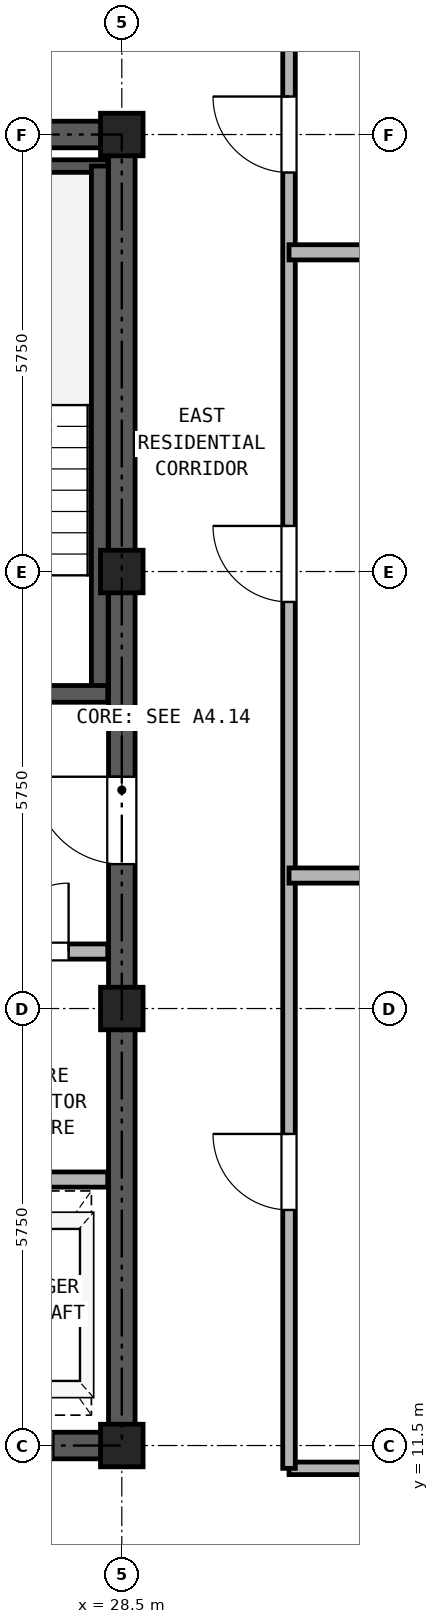
"""IFC4 building model, lengths in metres.
Left out: names, types, materials, properties, quantities, classifications, styles, units other than length and angle.
Written with IfcOpenShell. Run it as: python <this file> out.ifc"""

import sys

from ifc_helpers import new_model, si_unit, direction, frame, frame_2d, origin, origin_2d, place, context, subcontext, project, spatial, rectangle, hollow_rectangle, extrude, source, transform, mapped, element, fill, save


model = new_model("IFC4")
c1 = context("Model", 3, precision=1e-05, world=origin(), true_north=direction((0.0, 1.0)))
c2 = subcontext(c1, "Body", "Model", "MODEL_VIEW")
j1 = project(units=[si_unit("LENGTHUNIT", "METRE"), si_unit("PLANEANGLEUNIT", "RADIAN")], contexts=[c1])
p1 = place(None, origin())
s1 = spatial("IfcSite", under=j1, at=p1, CompositionType="ELEMENT")
p2 = place(p1, origin())
s2 = spatial("IfcBuilding", under=s1, at=p2, CompositionType="ELEMENT")
p3 = place(p2, frame((0.0, 0.0, 248.9)))
s3 = spatial("IfcBuildingStorey", under=s2, at=p3, CompositionType="ELEMENT", Elevation=248.9)
m1 = source(origin(), c2, "Body", "SweptSolid", [
    extrude(hollow_rectangle(XDim=0.56, YDim=0.56, WallThickness=0.03, at=origin_2d()), origin(), (0.0, 0.0, 1.0), 2.98),
])
for number, where, z_axis, x_axis in (
    (1, (28.5, 11.5, 0.0), (0.0, 0.0, 1.0), (1.0, 0.0, 0.0)),
    (2, (28.5, 17.25, 0.0), (0.0, 0.0, 1.0), (1.0, 0.0, 0.0)),
    (3, (28.5, 23.0, 0.0), (0.0, 0.0, 1.0), (1.0, 0.0, 0.0)),
    (4, (28.5, 28.75, 0.0), (0.0, 0.0, 1.0), (1.0, 0.0, 0.0)),
):
    element("IfcColumn", number, at=place(p3, frame(where, z_axis=z_axis, x_axis=x_axis)), inside=s3, PredefinedType="COLUMN", context=c2, shape_type="MappedRepresentation", body=[
        mapped(m1, transform((0.0, 0.0, 0.0), x_axis=(1.0, 0.0, 0.0), y_axis=(0.0, 1.0, 0.0), z_axis=(0.0, 0.0, 1.0), scale=1.0)),
    ])
p4 = place(p3, frame((18.325, 11.5, 0.0), z_axis=(0.0, 0.0, 1.0), x_axis=(1.0, 0.0, 0.0)))
e5 = element("IfcWall", 5, at=p4, inside=s3, PredefinedType="SHEAR", context=c2, shape_type="SweptSolid", body=[
    extrude(rectangle(XDim=10.35, YDim=0.35, at=frame_2d((5.175, 0.0))), origin(), (0.0, 0.0, 1.0), 2.98),
])
p5 = place(p4, frame((1.775, 0.0, 0.0)))
e6 = element("IfcOpeningElement", 6, at=p5, cuts=e5, PredefinedType="OPENING", context=c2, shape_type="SweptSolid", body=[
    extrude(rectangle(XDim=0.95, YDim=2.15, at=frame_2d((0.475, 1.075))), frame((0.0, 0.185, 0.0), z_axis=(0.0, -1.0, 0.0), x_axis=(1.0, 0.0, 0.0)), (0.0, 0.0, 1.0), 0.37),
])
p6 = place(p4, frame((5.275, 0.0, 0.0)))
e7 = element("IfcOpeningElement", 7, at=p6, cuts=e5, PredefinedType="OPENING", context=c2, shape_type="SweptSolid", body=[
    extrude(rectangle(XDim=0.95, YDim=2.15, at=frame_2d((0.475, 1.075))), frame((0.0, 0.185, 0.0), z_axis=(0.0, -1.0, 0.0), x_axis=(1.0, 0.0, 0.0)), (0.0, 0.0, 1.0), 0.37),
])
p7 = place(p4, frame((8.175, 0.0, 0.0)))
e8 = element("IfcOpeningElement", 8, at=p7, cuts=e5, PredefinedType="OPENING", context=c2, shape_type="SweptSolid", body=[
    extrude(rectangle(XDim=1.1, YDim=2.25, at=frame_2d((0.55, 1.125))), frame((0.0, 0.185, 0.0), z_axis=(0.0, -1.0, 0.0), x_axis=(1.0, 0.0, 0.0)), (0.0, 0.0, 1.0), 0.37),
])
p8 = place(p3, frame((18.325, 28.75, 0.0), z_axis=(0.0, 0.0, 1.0), x_axis=(1.0, 0.0, 0.0)))
e9 = element("IfcWall", 9, at=p8, inside=s3, PredefinedType="SHEAR", context=c2, shape_type="SweptSolid", body=[
    extrude(rectangle(XDim=10.35, YDim=0.35, at=frame_2d((5.175, 0.0))), origin(), (0.0, 0.0, 1.0), 2.98),
])
p9 = place(p8, frame((4.055, 0.0, 0.0)))
e10 = element("IfcOpeningElement", 10, at=p9, cuts=e9, PredefinedType="OPENING", context=c2, shape_type="SweptSolid", body=[
    extrude(rectangle(XDim=0.9, YDim=2.05, at=frame_2d((0.45, 1.025))), frame((0.0, 0.185, 0.0), z_axis=(0.0, -1.0, 0.0), x_axis=(1.0, 0.0, 0.0)), (0.0, 0.0, 1.0), 0.37),
])
p10 = place(p8, frame((5.595, 0.0, 0.0)))
e11 = element("IfcOpeningElement", 11, at=p10, cuts=e9, PredefinedType="OPENING", context=c2, shape_type="SweptSolid", body=[
    extrude(rectangle(XDim=0.9, YDim=2.05, at=frame_2d((0.45, 1.025))), frame((0.0, 0.185, 0.0), z_axis=(0.0, -1.0, 0.0), x_axis=(1.0, 0.0, 0.0)), (0.0, 0.0, 1.0), 0.37),
])
p11 = place(p3, frame((28.5, 11.675, 0.0), z_axis=(0.0, 0.0, 1.0), x_axis=(0.0, 1.0, 0.0)))
e12 = element("IfcWall", 12, at=p11, inside=s3, PredefinedType="SHEAR", context=c2, shape_type="SweptSolid", body=[
    extrude(rectangle(XDim=16.9, YDim=0.35, at=frame_2d((8.45, 0.0))), origin(), (0.0, 0.0, 1.0), 2.98),
])
p12 = place(p11, frame((7.475, 0.0, 0.0)))
e13 = element("IfcOpeningElement", 13, at=p12, cuts=e12, PredefinedType="OPENING", context=c2, shape_type="SweptSolid", body=[
    extrude(rectangle(XDim=1.15, YDim=2.2, at=frame_2d((0.575, 1.1))), frame((0.0, 0.185, 0.0), z_axis=(0.0, -1.0, 0.0), x_axis=(1.0, 0.0, 0.0)), (0.0, 0.0, 1.0), 0.37),
])
p13 = place(p3, frame((25.13, 28.335, 0.0), z_axis=(0.0, 0.0, 1.0), x_axis=(1.0, 0.0, 0.0)))
e14 = element("IfcWall", 14, at=p13, inside=s3, PredefinedType="PARTITIONING", context=c2, shape_type="SweptSolid", body=[
    extrude(rectangle(XDim=3.185, YDim=0.165, at=frame_2d((1.593, 0.0))), origin(), (0.0, 0.0, 1.0), 2.98),
])
p14 = place(p3, frame((28.21, 21.39, 0.0), z_axis=(0.0, 0.0, 1.0), x_axis=(0.0, 1.0, 0.0)))
e15 = element("IfcWall", 15, at=p14, inside=s3, PredefinedType="SOLIDWALL", context=c2, shape_type="SweptSolid", body=[
    extrude(rectangle(XDim=6.945, YDim=0.22, at=frame_2d((3.473, 0.0))), origin(), (0.0, 0.0, 1.0), 2.98),
])
p15 = place(p3, frame((25.13, 21.39, 0.0), z_axis=(0.0, 0.0, 1.0), x_axis=(1.0, 0.0, 0.0)))
e16 = element("IfcWall", 16, at=p15, inside=s3, PredefinedType="SOLIDWALL", context=c2, shape_type="SweptSolid", body=[
    extrude(rectangle(XDim=3.185, YDim=0.22, at=frame_2d((1.593, 0.0))), origin(), (0.0, 0.0, 1.0), 2.98),
])
p16 = place(p15, frame((0.92, 0.0, 0.0)))
e17 = element("IfcOpeningElement", 17, at=p16, cuts=e16, PredefinedType="OPENING", context=c2, shape_type="SweptSolid", body=[
    extrude(rectangle(XDim=1.15, YDim=2.2, at=frame_2d((0.575, 1.1))), frame((0.0, 0.12, 0.0), z_axis=(0.0, -1.0, 0.0), x_axis=(1.0, 0.0, 0.0)), (0.0, 0.0, 1.0), 0.24),
])
p17 = place(p3, frame((18.685, 18.0, 0.0), z_axis=(0.0, 0.0, 1.0), x_axis=(1.0, 0.0, 0.0)))
e18 = element("IfcWall", 18, at=p17, inside=s3, PredefinedType="PARTITIONING", context=c2, shape_type="SweptSolid", body=[
    extrude(rectangle(XDim=9.63, YDim=0.2, at=frame_2d((4.815, 0.0))), origin(), (0.0, 0.0, 1.0), 2.98),
])
p18 = place(p17, frame((0.565, 0.0, 0.0)))
e19 = element("IfcOpeningElement", 19, at=p18, cuts=e18, PredefinedType="OPENING", context=c2, shape_type="SweptSolid", body=[
    extrude(rectangle(XDim=1.3, YDim=2.3, at=frame_2d((0.65, 1.15))), frame((0.0, 0.11, 0.0), z_axis=(0.0, -1.0, 0.0), x_axis=(1.0, 0.0, 0.0)), (0.0, 0.0, 1.0), 0.22),
])
p19 = place(p17, frame((2.665, 0.0, 0.0)))
e20 = element("IfcOpeningElement", 20, at=p19, cuts=e18, PredefinedType="OPENING", context=c2, shape_type="SweptSolid", body=[
    extrude(rectangle(XDim=1.3, YDim=2.3, at=frame_2d((0.65, 1.15))), frame((0.0, 0.11, 0.0), z_axis=(0.0, -1.0, 0.0), x_axis=(1.0, 0.0, 0.0)), (0.0, 0.0, 1.0), 0.22),
])
p20 = place(p17, frame((5.085, 0.0, 0.0)))
e21 = element("IfcOpeningElement", 21, at=p20, cuts=e18, PredefinedType="OPENING", context=c2, shape_type="SweptSolid", body=[
    extrude(rectangle(XDim=0.9, YDim=2.05, at=frame_2d((0.45, 1.025))), frame((0.0, 0.11, 0.0), z_axis=(0.0, -1.0, 0.0), x_axis=(1.0, 0.0, 0.0)), (0.0, 0.0, 1.0), 0.22),
])
p21 = place(p17, frame((8.215, 0.0, 0.0)))
e22 = element("IfcOpeningElement", 22, at=p21, cuts=e18, PredefinedType="OPENING", context=c2, shape_type="SweptSolid", body=[
    extrude(rectangle(XDim=0.9, YDim=2.05, at=frame_2d((0.45, 1.025))), frame((0.0, 0.11, 0.0), z_axis=(0.0, -1.0, 0.0), x_axis=(1.0, 0.0, 0.0)), (0.0, 0.0, 1.0), 0.22),
])
p22 = place(p3, frame((18.685, 15.0, 0.0), z_axis=(0.0, 0.0, 1.0), x_axis=(1.0, 0.0, 0.0)))
e23 = element("IfcWall", 23, at=p22, inside=s3, PredefinedType="PARTITIONING", context=c2, shape_type="SweptSolid", body=[
    extrude(rectangle(XDim=9.63, YDim=0.2, at=frame_2d((4.815, 0.0))), origin(), (0.0, 0.0, 1.0), 2.98),
])
p23 = place(p3, frame((30.7, 11.2, 0.0), z_axis=(0.0, 0.0, 1.0), x_axis=(1.0, 0.0, 0.0)))
e24 = element("IfcWall", 24, at=p23, inside=s3, PredefinedType="PARTITIONING", context=c2, shape_type="SweptSolid", body=[
    extrude(rectangle(XDim=7.5, YDim=0.165, at=frame_2d((3.75, 0.0))), origin(), (0.0, 0.0, 1.0), 2.98),
])
p24 = place(p3, frame((30.7, 11.2, 0.0), z_axis=(0.0, 0.0, 1.0), x_axis=(0.0, 1.0, 0.0)))
e25 = element("IfcWall", 25, at=p24, inside=s3, PredefinedType="PARTITIONING", context=c2, shape_type="SweptSolid", body=[
    extrude(rectangle(XDim=23.94, YDim=0.165, at=frame_2d((11.97, 0.0))), origin(), (0.0, 0.0, 1.0), 2.98),
])
p25 = place(p24, frame((3.4, 0.0, 0.0)))
e26 = element("IfcOpeningElement", 26, at=p25, cuts=e25, PredefinedType="OPENING", context=c2, shape_type="SweptSolid", body=[
    extrude(rectangle(XDim=1.0, YDim=2.15, at=frame_2d((0.5, 1.075))), frame((0.0, 0.093, 0.0), z_axis=(0.0, -1.0, 0.0), x_axis=(1.0, 0.0, 0.0)), (0.0, 0.0, 1.0), 0.185),
])
p26 = place(p24, frame((11.4, 0.0, 0.0)))
e27 = element("IfcOpeningElement", 27, at=p26, cuts=e25, PredefinedType="OPENING", context=c2, shape_type="SweptSolid", body=[
    extrude(rectangle(XDim=1.0, YDim=2.15, at=frame_2d((0.5, 1.075))), frame((0.0, 0.093, 0.0), z_axis=(0.0, -1.0, 0.0), x_axis=(1.0, 0.0, 0.0)), (0.0, 0.0, 1.0), 0.185),
])
p27 = place(p24, frame((17.05, 0.0, 0.0)))
e28 = element("IfcOpeningElement", 28, at=p27, cuts=e25, PredefinedType="OPENING", context=c2, shape_type="SweptSolid", body=[
    extrude(rectangle(XDim=1.0, YDim=2.15, at=frame_2d((0.5, 1.075))), frame((0.0, 0.093, 0.0), z_axis=(0.0, -1.0, 0.0), x_axis=(1.0, 0.0, 0.0)), (0.0, 0.0, 1.0), 0.185),
])
for number, where, z_axis, x_axis in (
    (29, (30.7, 19.0, 0.0), (0.0, 0.0, 1.0), (1.0, 0.0, 0.0)),
    (30, (30.7, 27.2, 0.0), (0.0, 0.0, 1.0), (1.0, 0.0, 0.0)),
):
    element("IfcWall", number, at=place(p3, frame(where, z_axis=z_axis, x_axis=x_axis)), inside=s3, PredefinedType="PARTITIONING", context=c2, shape_type="SweptSolid", body=[
        extrude(rectangle(XDim=10.94, YDim=0.2, at=frame_2d((5.47, 0.0))), origin(), (0.0, 0.0, 1.0), 2.98),
    ])
p28 = place(p21, frame((0.9, 0.0, 0.0), z_axis=(0.0, 0.0, 1.0), x_axis=(-1.0, 0.0, 0.0)))
e31 = element("IfcDoor", 31, at=p28, inside=s3, OperationType="SINGLE_SWING_RIGHT", PredefinedType="DOOR", context=c2, shape_type="SweptSolid", body=[
    extrude(rectangle(XDim=0.9, YDim=2.05, at=frame_2d((0.45, 1.025))), frame((0.0, 0.025, 0.0), z_axis=(0.0, -1.0, 0.0), x_axis=(1.0, 0.0, 0.0)), (0.0, 0.0, 1.0), 0.05),
])
fill(e22, e31)
p29 = place(p12, origin())
e32 = element("IfcDoor", 32, at=p29, inside=s3, OperationType="SINGLE_SWING_RIGHT", PredefinedType="DOOR", context=c2, shape_type="SweptSolid", body=[
    extrude(rectangle(XDim=1.15, YDim=2.2, at=frame_2d((0.575, 1.1))), frame((0.0, 0.025, 0.0), z_axis=(0.0, -1.0, 0.0), x_axis=(1.0, 0.0, 0.0)), (0.0, 0.0, 1.0), 0.05),
])
fill(e13, e32)
p30 = place(p7, frame((1.1, 0.0, 0.0), z_axis=(0.0, 0.0, 1.0), x_axis=(-1.0, 0.0, 0.0)))
e33 = element("IfcDoor", 33, at=p30, inside=s3, OperationType="DOUBLE_DOOR_SLIDING", PredefinedType="DOOR", context=c2, shape_type="SweptSolid", body=[
    extrude(rectangle(XDim=1.1, YDim=2.25, at=frame_2d((0.55, 1.125))), frame((0.0, 0.025, 0.0), z_axis=(0.0, -1.0, 0.0), x_axis=(1.0, 0.0, 0.0)), (0.0, 0.0, 1.0), 0.05),
])
fill(e8, e33)
p31 = place(p25, frame((1.0, 0.0, 0.0), z_axis=(0.0, 0.0, 1.0), x_axis=(-1.0, 0.0, 0.0)))
e34 = element("IfcDoor", 34, at=p31, inside=s3, OperationType="SINGLE_SWING_RIGHT", PredefinedType="DOOR", context=c2, shape_type="SweptSolid", body=[
    extrude(rectangle(XDim=1.0, YDim=2.15, at=frame_2d((0.5, 1.075))), frame((0.0, 0.025, 0.0), z_axis=(0.0, -1.0, 0.0), x_axis=(1.0, 0.0, 0.0)), (0.0, 0.0, 1.0), 0.05),
])
fill(e26, e34)
p32 = place(p26, frame((1.0, 0.0, 0.0), z_axis=(0.0, 0.0, 1.0), x_axis=(-1.0, 0.0, 0.0)))
e35 = element("IfcDoor", 35, at=p32, inside=s3, OperationType="SINGLE_SWING_RIGHT", PredefinedType="DOOR", context=c2, shape_type="SweptSolid", body=[
    extrude(rectangle(XDim=1.0, YDim=2.15, at=frame_2d((0.5, 1.075))), frame((0.0, 0.025, 0.0), z_axis=(0.0, -1.0, 0.0), x_axis=(1.0, 0.0, 0.0)), (0.0, 0.0, 1.0), 0.05),
])
fill(e27, e35)
p33 = place(p27, frame((1.0, 0.0, 0.0), z_axis=(0.0, 0.0, 1.0), x_axis=(-1.0, 0.0, 0.0)))
e36 = element("IfcDoor", 36, at=p33, inside=s3, OperationType="SINGLE_SWING_RIGHT", PredefinedType="DOOR", context=c2, shape_type="SweptSolid", body=[
    extrude(rectangle(XDim=1.0, YDim=2.15, at=frame_2d((0.5, 1.075))), frame((0.0, 0.025, 0.0), z_axis=(0.0, -1.0, 0.0), x_axis=(1.0, 0.0, 0.0)), (0.0, 0.0, 1.0), 0.05),
])
fill(e28, e36)
save(model, sys.argv[1])
